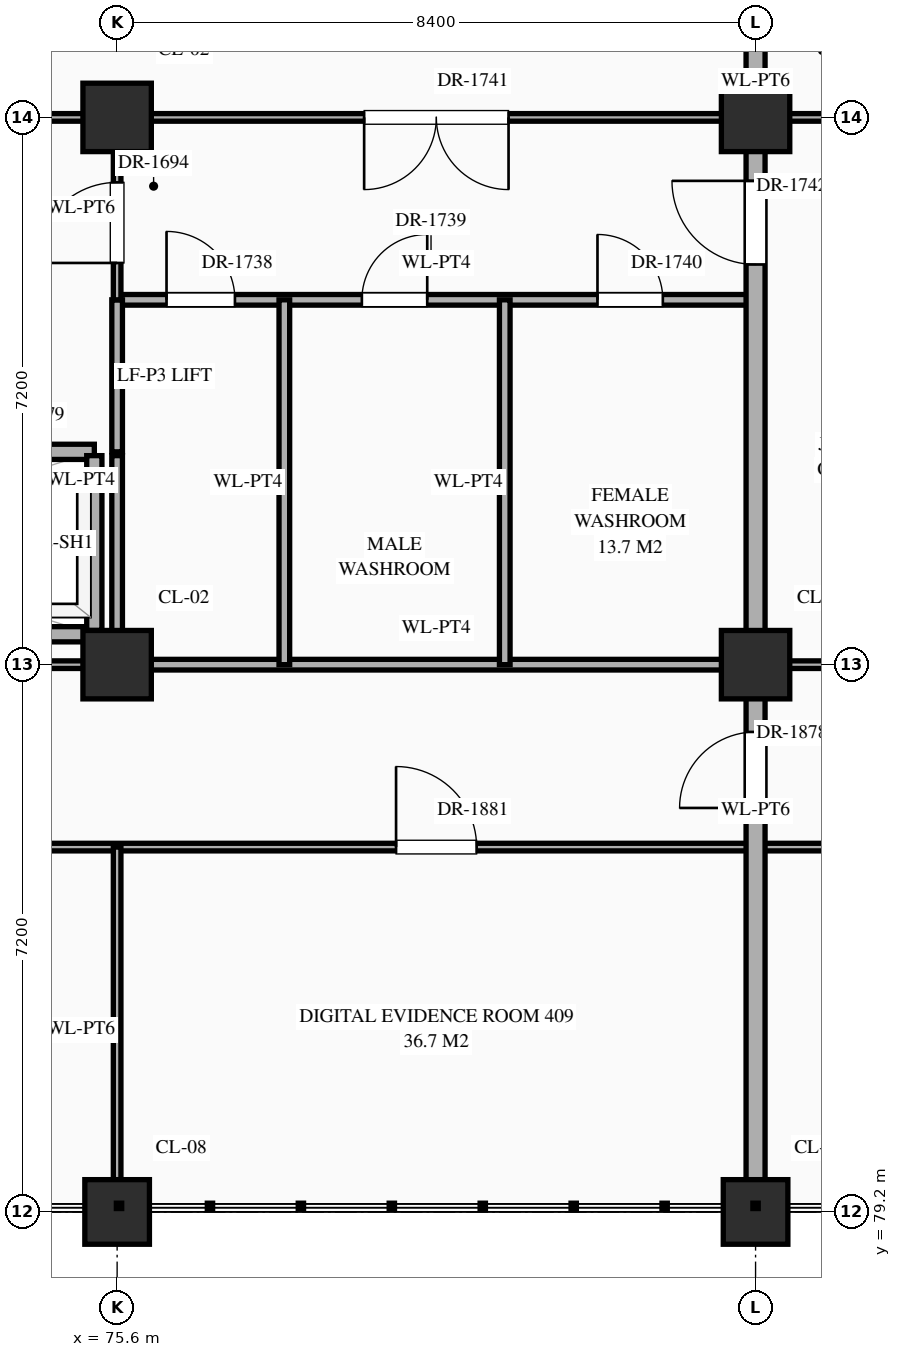
"""IFC4 building model, lengths in metres.
Left out: names, types, materials, properties, quantities, classifications, styles, units other than length and angle.
Written with IfcOpenShell. Run it as: python <this file> out.ifc"""

import sys

from ifc_helpers import new_model, si_unit, direction, frame, frame_2d, origin, origin_2d, place, context, subcontext, project, spatial, rectangle, circle, extrude, element, fill, save


model = new_model("IFC4")
c1 = context("Model", 3, precision=1e-05, world=origin(), true_north=direction((0.0, 1.0)))
c2 = subcontext(c1, "Body", "Model", "MODEL_VIEW")
j1 = project(units=[si_unit("LENGTHUNIT", "METRE"), si_unit("PLANEANGLEUNIT", "RADIAN")], contexts=[c1])
p1 = place(None, origin())
s1 = spatial("IfcSite", under=j1, at=p1, CompositionType="ELEMENT")
p2 = place(p1, origin())
s2 = spatial("IfcBuilding", under=s1, at=p2, CompositionType="ELEMENT")
p3 = place(p2, frame((0.0, 0.0, 16.2)))
s3 = spatial("IfcBuildingStorey", under=s2, at=p3, CompositionType="ELEMENT", Elevation=16.2)
p4 = place(p3, frame((75.6, 79.2, 0.0), z_axis=(0.0, 0.0, 1.0), x_axis=(1.0, 0.0, 0.0)))
e1 = element("IfcColumn", 1, at=p4, inside=s3, PredefinedType="COLUMN", context=c2, shape_type="SweptSolid", body=[
    extrude(circle(Radius=0.425, at=origin_2d()), origin(), (0.0, 0.0, 1.0), 5.4),
])
for number, where, z_axis, x_axis in (
    (2, (75.6, 86.4, 0.0), (0.0, 0.0, 1.0), (1.0, 0.0, 0.0)),
    (3, (75.6, 93.6, 0.0), (0.0, 0.0, 1.0), (1.0, 0.0, 0.0)),
):
    element("IfcColumn", number, at=place(p3, frame(where, z_axis=z_axis, x_axis=x_axis)), inside=s3, PredefinedType="COLUMN", context=c2, shape_type="SweptSolid", body=[
        extrude(rectangle(XDim=0.9, YDim=0.9, at=origin_2d()), origin(), (0.0, 0.0, 1.0), 5.4),
    ])
p5 = place(p3, frame((84.0, 79.2, 0.0), z_axis=(0.0, 0.0, 1.0), x_axis=(1.0, 0.0, 0.0)))
e4 = element("IfcColumn", 4, at=p5, inside=s3, PredefinedType="COLUMN", context=c2, shape_type="SweptSolid", body=[
    extrude(circle(Radius=0.425, at=origin_2d()), origin(), (0.0, 0.0, 1.0), 5.4),
])
for number, where, z_axis, x_axis in (
    (5, (84.0, 86.4, 0.0), (0.0, 0.0, 1.0), (1.0, 0.0, 0.0)),
    (6, (84.0, 93.6, 0.0), (0.0, 0.0, 1.0), (1.0, 0.0, 0.0)),
):
    element("IfcColumn", number, at=place(p3, frame(where, z_axis=z_axis, x_axis=x_axis)), inside=s3, PredefinedType="COLUMN", context=c2, shape_type="SweptSolid", body=[
        extrude(rectangle(XDim=0.9, YDim=0.9, at=origin_2d()), origin(), (0.0, 0.0, 1.0), 5.4),
    ])
p6 = place(p3, frame((67.2, 84.0, 0.0), z_axis=(0.0, 0.0, 1.0), x_axis=(1.0, 0.0, 0.0)))
e7 = element("IfcWall", 7, at=p6, inside=s3, PredefinedType="STANDARD", context=c2, shape_type="SweptSolid", body=[
    extrude(rectangle(XDim=33.6, YDim=0.1, at=frame_2d((16.8, 0.0))), origin(), (0.0, 0.0, 1.0), 5.12),
])
p7 = place(p6, frame((3.69, 0.0, 0.0)))
e8 = element("IfcOpeningElement", 8, at=p7, cuts=e7, PredefinedType="OPENING", context=c2, shape_type="SweptSolid", body=[
    extrude(rectangle(XDim=1.02, YDim=2.4, at=frame_2d((0.51, 1.2))), frame((0.0, 0.062, 0.0), z_axis=(0.0, -1.0, 0.0), x_axis=(1.0, 0.0, 0.0)), (0.0, 0.0, 1.0), 0.124),
])
p8 = place(p6, frame((12.07, 0.0, 0.0)))
e9 = element("IfcOpeningElement", 9, at=p8, cuts=e7, PredefinedType="OPENING", context=c2, shape_type="SweptSolid", body=[
    extrude(rectangle(XDim=1.06, YDim=2.4, at=frame_2d((0.53, 1.2))), frame((0.0, 0.062, 0.0), z_axis=(0.0, -1.0, 0.0), x_axis=(1.0, 0.0, 0.0)), (0.0, 0.0, 1.0), 0.124),
])
p9 = place(p6, frame((20.55, 0.0, 0.0)))
e10 = element("IfcOpeningElement", 10, at=p9, cuts=e7, PredefinedType="OPENING", context=c2, shape_type="SweptSolid", body=[
    extrude(rectangle(XDim=0.9, YDim=2.15, at=frame_2d((0.45, 1.075))), frame((0.0, 0.062, 0.0), z_axis=(0.0, -1.0, 0.0), x_axis=(1.0, 0.0, 0.0)), (0.0, 0.0, 1.0), 0.124),
])
p10 = place(p6, frame((28.97, 0.0, 0.0)))
e11 = element("IfcOpeningElement", 11, at=p10, cuts=e7, PredefinedType="OPENING", context=c2, shape_type="SweptSolid", body=[
    extrude(rectangle(XDim=0.86, YDim=2.1, at=frame_2d((0.43, 1.05))), frame((0.0, 0.062, 0.0), z_axis=(0.0, -1.0, 0.0), x_axis=(1.0, 0.0, 0.0)), (0.0, 0.0, 1.0), 0.124),
])
p11 = place(p3, frame((67.25, 86.4, 0.0), z_axis=(0.0, 0.0, 1.0), x_axis=(1.0, 0.0, 0.0)))
e12 = element("IfcWall", 12, at=p11, inside=s3, PredefinedType="STANDARD", context=c2, shape_type="SweptSolid", body=[
    extrude(rectangle(XDim=8.3, YDim=0.1, at=frame_2d((4.15, 0.0))), origin(), (0.0, 0.0, 1.0), 4.27),
])
p12 = place(p3, frame((75.6, 86.4, 0.0), z_axis=(0.0, 0.0, 1.0), x_axis=(1.0, 0.0, 0.0)))
e13 = element("IfcWall", 13, at=p12, inside=s3, PredefinedType="STANDARD", context=c2, shape_type="SweptSolid", body=[
    extrude(rectangle(XDim=8.4, YDim=0.14, at=frame_2d((4.2, 0.0))), origin(), (0.0, 0.0, 1.0), 4.27),
])
p13 = place(p3, frame((84.0, 86.4, 0.0), z_axis=(0.0, 0.0, 1.0), x_axis=(1.0, 0.0, 0.0)))
e14 = element("IfcWall", 14, at=p13, inside=s3, PredefinedType="STANDARD", context=c2, shape_type="SweptSolid", body=[
    extrude(rectangle(XDim=8.4, YDim=0.1, at=frame_2d((4.2, 0.0))), origin(), (0.0, 0.0, 1.0), 4.27),
])
p14 = place(p13, frame((1.065, 0.0, 0.0)))
e15 = element("IfcOpeningElement", 15, at=p14, cuts=e14, PredefinedType="OPENING", context=c2, shape_type="SweptSolid", body=[
    extrude(rectangle(XDim=1.04, YDim=2.2, at=frame_2d((0.52, 1.1))), frame((0.0, 0.062, 0.0), z_axis=(0.0, -1.0, 0.0), x_axis=(1.0, 0.0, 0.0)), (0.0, 0.0, 1.0), 0.124),
])
p15 = place(p13, frame((3.64, 0.0, 0.0)))
e16 = element("IfcOpeningElement", 16, at=p15, cuts=e14, PredefinedType="OPENING", context=c2, shape_type="SweptSolid", body=[
    extrude(rectangle(XDim=1.12, YDim=2.25, at=frame_2d((0.56, 1.125))), frame((0.0, 0.062, 0.0), z_axis=(0.0, -1.0, 0.0), x_axis=(1.0, 0.0, 0.0)), (0.0, 0.0, 1.0), 0.124),
])
p16 = place(p13, frame((6.235, 0.0, 0.0)))
e17 = element("IfcOpeningElement", 17, at=p16, cuts=e14, PredefinedType="OPENING", context=c2, shape_type="SweptSolid", body=[
    extrude(rectangle(XDim=1.16, YDim=2.3, at=frame_2d((0.58, 1.15))), frame((0.0, 0.062, 0.0), z_axis=(0.0, -1.0, 0.0), x_axis=(1.0, 0.0, 0.0)), (0.0, 0.0, 1.0), 0.124),
])
p17 = place(p3, frame((72.8, 86.8, 0.0), z_axis=(0.0, 0.0, 1.0), x_axis=(1.0, 0.0, 0.0)))
e18 = element("IfcWall", 18, at=p17, inside=s3, PredefinedType="STANDARD", context=c2, shape_type="SweptSolid", body=[
    extrude(rectangle(XDim=2.5, YDim=0.2, at=frame_2d((1.25, 0.0))), origin(), (0.0, 0.0, 1.0), 5.12),
])
p18 = place(p3, frame((67.6, 89.2, 0.0), z_axis=(0.0, 0.0, 1.0), x_axis=(1.0, 0.0, 0.0)))
e19 = element("IfcWall", 19, at=p18, inside=s3, PredefinedType="STANDARD", context=c2, shape_type="SweptSolid", body=[
    extrude(rectangle(XDim=7.7, YDim=0.2, at=frame_2d((3.85, 0.0))), origin(), (0.0, 0.0, 1.0), 5.12),
])
p19 = place(p18, frame((0.725, 0.0, 0.0)))
e20 = element("IfcOpeningElement", 20, at=p19, cuts=e19, PredefinedType="OPENING", context=c2, shape_type="SweptSolid", body=[
    extrude(rectangle(XDim=1.1, YDim=2.15, at=frame_2d((0.55, 1.075))), frame((0.0, 0.112, 0.0), z_axis=(0.0, -1.0, 0.0), x_axis=(1.0, 0.0, 0.0)), (0.0, 0.0, 1.0), 0.224),
])
p20 = place(p18, frame((3.3, 0.0, 0.0)))
e21 = element("IfcOpeningElement", 21, at=p20, cuts=e19, PredefinedType="OPENING", context=c2, shape_type="SweptSolid", body=[
    extrude(rectangle(XDim=1.1, YDim=2.15, at=frame_2d((0.55, 1.075))), frame((0.0, 0.112, 0.0), z_axis=(0.0, -1.0, 0.0), x_axis=(1.0, 0.0, 0.0)), (0.0, 0.0, 1.0), 0.224),
])
p21 = place(p18, frame((5.875, 0.0, 0.0)))
e22 = element("IfcOpeningElement", 22, at=p21, cuts=e19, PredefinedType="OPENING", context=c2, shape_type="SweptSolid", body=[
    extrude(rectangle(XDim=1.1, YDim=2.15, at=frame_2d((0.55, 1.075))), frame((0.0, 0.112, 0.0), z_axis=(0.0, -1.0, 0.0), x_axis=(1.0, 0.0, 0.0)), (0.0, 0.0, 1.0), 0.224),
])
p22 = place(p3, frame((75.6, 91.2, 0.0), z_axis=(0.0, 0.0, 1.0), x_axis=(1.0, 0.0, 0.0)))
e23 = element("IfcWall", 23, at=p22, inside=s3, PredefinedType="STANDARD", context=c2, shape_type="SweptSolid", body=[
    extrude(rectangle(XDim=8.4, YDim=0.14, at=frame_2d((4.2, 0.0))), origin(), (0.0, 0.0, 1.0), 5.12),
])
p23 = place(p22, frame((0.65, 0.0, 0.0)))
e24 = element("IfcOpeningElement", 24, at=p23, cuts=e23, PredefinedType="OPENING", context=c2, shape_type="SweptSolid", body=[
    extrude(rectangle(XDim=0.9, YDim=2.15, at=frame_2d((0.45, 1.075))), frame((0.0, 0.082, 0.0), z_axis=(0.0, -1.0, 0.0), x_axis=(1.0, 0.0, 0.0)), (0.0, 0.0, 1.0), 0.164),
])
p24 = place(p22, frame((3.22, 0.0, 0.0)))
e25 = element("IfcOpeningElement", 25, at=p24, cuts=e23, PredefinedType="OPENING", context=c2, shape_type="SweptSolid", body=[
    extrude(rectangle(XDim=0.86, YDim=2.1, at=frame_2d((0.43, 1.05))), frame((0.0, 0.082, 0.0), z_axis=(0.0, -1.0, 0.0), x_axis=(1.0, 0.0, 0.0)), (0.0, 0.0, 1.0), 0.164),
])
p25 = place(p22, frame((6.32, 0.0, 0.0)))
e26 = element("IfcOpeningElement", 26, at=p25, cuts=e23, PredefinedType="OPENING", context=c2, shape_type="SweptSolid", body=[
    extrude(rectangle(XDim=0.86, YDim=2.1, at=frame_2d((0.43, 1.05))), frame((0.0, 0.082, 0.0), z_axis=(0.0, -1.0, 0.0), x_axis=(1.0, 0.0, 0.0)), (0.0, 0.0, 1.0), 0.164),
])
p26 = place(p3, frame((67.2, 93.6, 0.0), z_axis=(0.0, 0.0, 1.0), x_axis=(1.0, 0.0, 0.0)))
e27 = element("IfcWall", 27, at=p26, inside=s3, PredefinedType="STANDARD", context=c2, shape_type="SweptSolid", body=[
    extrude(rectangle(XDim=33.6, YDim=0.1, at=frame_2d((16.8, 0.0))), origin(), (0.0, 0.0, 1.0), 4.27),
])
p27 = place(p26, frame((3.375, 0.0, 0.0)))
e28 = element("IfcOpeningElement", 28, at=p27, cuts=e27, PredefinedType="OPENING", context=c2, shape_type="SweptSolid", body=[
    extrude(rectangle(XDim=1.65, YDim=2.4, at=frame_2d((0.825, 1.2))), frame((0.0, 0.062, 0.0), z_axis=(0.0, -1.0, 0.0), x_axis=(1.0, 0.0, 0.0)), (0.0, 0.0, 1.0), 0.124),
])
p28 = place(p26, frame((28.625, 0.0, 0.0)))
e29 = element("IfcOpeningElement", 29, at=p28, cuts=e27, PredefinedType="OPENING", context=c2, shape_type="SweptSolid", body=[
    extrude(rectangle(XDim=1.55, YDim=2.35, at=frame_2d((0.775, 1.175))), frame((0.0, 0.062, 0.0), z_axis=(0.0, -1.0, 0.0), x_axis=(1.0, 0.0, 0.0)), (0.0, 0.0, 1.0), 0.124),
])
p29 = place(p26, frame((11.65, 0.0, 0.0)))
e30 = element("IfcOpeningElement", 30, at=p29, cuts=e27, PredefinedType="OPENING", context=c2, shape_type="SweptSolid", body=[
    extrude(rectangle(XDim=1.9, YDim=2.5, at=frame_2d((0.95, 1.25))), frame((0.0, 0.062, 0.0), z_axis=(0.0, -1.0, 0.0), x_axis=(1.0, 0.0, 0.0)), (0.0, 0.0, 1.0), 0.124),
])
p30 = place(p26, frame((17.935, 0.0, 0.0)))
e31 = element("IfcOpeningElement", 31, at=p30, cuts=e27, PredefinedType="OPENING", context=c2, shape_type="SweptSolid", body=[
    extrude(rectangle(XDim=0.9, YDim=2.15, at=frame_2d((0.45, 1.075))), frame((0.0, 0.062, 0.0), z_axis=(0.0, -1.0, 0.0), x_axis=(1.0, 0.0, 0.0)), (0.0, 0.0, 1.0), 0.124),
])
p31 = place(p26, frame((20.57, 0.0, 0.0)))
e32 = element("IfcOpeningElement", 32, at=p31, cuts=e27, PredefinedType="OPENING", context=c2, shape_type="SweptSolid", body=[
    extrude(rectangle(XDim=0.86, YDim=2.1, at=frame_2d((0.43, 1.05))), frame((0.0, 0.062, 0.0), z_axis=(0.0, -1.0, 0.0), x_axis=(1.0, 0.0, 0.0)), (0.0, 0.0, 1.0), 0.124),
])
p32 = place(p26, frame((23.155, 0.0, 0.0)))
e33 = element("IfcOpeningElement", 33, at=p32, cuts=e27, PredefinedType="OPENING", context=c2, shape_type="SweptSolid", body=[
    extrude(rectangle(XDim=0.92, YDim=2.15, at=frame_2d((0.46, 1.075))), frame((0.0, 0.062, 0.0), z_axis=(0.0, -1.0, 0.0), x_axis=(1.0, 0.0, 0.0)), (0.0, 0.0, 1.0), 0.124),
])
p33 = place(p3, frame((75.3, 86.85, 0.0), z_axis=(0.0, 0.0, 1.0), x_axis=(0.0, 1.0, 0.0)))
e34 = element("IfcWall", 34, at=p33, inside=s3, PredefinedType="STANDARD", context=c2, shape_type="SweptSolid", body=[
    extrude(rectangle(XDim=2.3, YDim=0.2, at=frame_2d((1.15, 0.0))), origin(), (0.0, 0.0, 1.0), 5.12),
])
p34 = place(p3, frame((75.6, 79.2, 0.0), z_axis=(0.0, 0.0, 1.0), x_axis=(0.0, 1.0, 0.0)))
e35 = element("IfcWall", 35, at=p34, inside=s3, PredefinedType="STANDARD", context=c2, shape_type="SweptSolid", body=[
    extrude(rectangle(XDim=4.8, YDim=0.1, at=frame_2d((2.4, 0.0))), origin(), (0.0, 0.0, 1.0), 4.37),
])
p35 = place(p3, frame((75.6, 86.45, 0.0), z_axis=(0.0, 0.0, 1.0), x_axis=(0.0, 1.0, 0.0)))
e36 = element("IfcWall", 36, at=p35, inside=s3, PredefinedType="STANDARD", context=c2, shape_type="SweptSolid", body=[
    extrude(rectangle(XDim=2.7, YDim=0.14, at=frame_2d((1.35, 0.0))), origin(), (0.0, 0.0, 1.0), 4.37),
])
p36 = place(p3, frame((75.6, 89.2, 0.0), z_axis=(0.0, 0.0, 1.0), x_axis=(0.0, 1.0, 0.0)))
e37 = element("IfcWall", 37, at=p36, inside=s3, PredefinedType="STANDARD", context=c2, shape_type="SweptSolid", body=[
    extrude(rectangle(XDim=2.0, YDim=0.14, at=frame_2d((1.0, 0.0))), origin(), (0.0, 0.0, 1.0), 4.37),
])
p37 = place(p3, frame((75.6, 91.2, 0.0), z_axis=(0.0, 0.0, 1.0), x_axis=(0.0, 1.0, 0.0)))
e38 = element("IfcWall", 38, at=p37, inside=s3, PredefinedType="STANDARD", context=c2, shape_type="SweptSolid", body=[
    extrude(rectangle(XDim=2.4, YDim=0.1, at=frame_2d((1.2, 0.0))), origin(), (0.0, 0.0, 1.0), 4.37),
])
p38 = place(p37, frame((0.485, 0.0, 0.0)))
e39 = element("IfcOpeningElement", 39, at=p38, cuts=e38, PredefinedType="OPENING", context=c2, shape_type="SweptSolid", body=[
    extrude(rectangle(XDim=1.06, YDim=2.4, at=frame_2d((0.53, 1.2))), frame((0.0, 0.062, 0.0), z_axis=(0.0, -1.0, 0.0), x_axis=(1.0, 0.0, 0.0)), (0.0, 0.0, 1.0), 0.124),
])
for number, where, z_axis, x_axis in (
    (40, (77.8, 86.4, 0.0), (0.0, 0.0, 1.0), (0.0, 1.0, 0.0)),
    (41, (80.7, 86.4, 0.0), (0.0, 0.0, 1.0), (0.0, 1.0, 0.0)),
):
    element("IfcWall", number, at=place(p3, frame(where, z_axis=z_axis, x_axis=x_axis)), inside=s3, PredefinedType="STANDARD", context=c2, shape_type="SweptSolid", body=[
        extrude(rectangle(XDim=4.8, YDim=0.14, at=frame_2d((2.4, 0.0))), origin(), (0.0, 0.0, 1.0), 5.12),
    ])
p39 = place(p3, frame((84.0, 79.2, 0.0), z_axis=(0.0, 0.0, 1.0), x_axis=(0.0, 1.0, 0.0)))
e42 = element("IfcWall", 42, at=p39, inside=s3, PredefinedType="STANDARD", context=c2, shape_type="SweptSolid", body=[
    extrude(rectangle(XDim=35.96, YDim=0.25, at=frame_2d((17.98, 0.0))), origin(), (0.0, 0.0, 1.0), 4.37),
])
p40 = place(p39, frame((22.585, 0.0, 0.0)))
e43 = element("IfcOpeningElement", 43, at=p40, cuts=e42, PredefinedType="OPENING", context=c2, shape_type="SweptSolid", body=[
    extrude(rectangle(XDim=2.0, YDim=2.4, at=frame_2d((1.0, 1.2))), frame((0.0, 0.137, 0.0), z_axis=(0.0, -1.0, 0.0), x_axis=(1.0, 0.0, 0.0)), (0.0, 0.0, 1.0), 0.274),
])
p41 = place(p39, frame((12.465, 0.0, 0.0)))
e44 = element("IfcOpeningElement", 44, at=p41, cuts=e42, PredefinedType="OPENING", context=c2, shape_type="SweptSolid", body=[
    extrude(rectangle(XDim=1.1, YDim=2.2, at=frame_2d((0.55, 1.1))), frame((0.0, 0.137, 0.0), z_axis=(0.0, -1.0, 0.0), x_axis=(1.0, 0.0, 0.0)), (0.0, 0.0, 1.0), 0.274),
])
p42 = place(p39, frame((15.31, 0.0, 0.0)))
e45 = element("IfcOpeningElement", 45, at=p42, cuts=e42, PredefinedType="OPENING", context=c2, shape_type="SweptSolid", body=[
    extrude(rectangle(XDim=0.95, YDim=2.15, at=frame_2d((0.475, 1.075))), frame((0.0, 0.137, 0.0), z_axis=(0.0, -1.0, 0.0), x_axis=(1.0, 0.0, 0.0)), (0.0, 0.0, 1.0), 0.274),
])
p43 = place(p39, frame((26.065, 0.0, 0.0)))
e46 = element("IfcOpeningElement", 46, at=p43, cuts=e42, PredefinedType="OPENING", context=c2, shape_type="SweptSolid", body=[
    extrude(rectangle(XDim=1.5, YDim=2.25, at=frame_2d((0.75, 1.125))), frame((0.0, 0.137, 0.0), z_axis=(0.0, -1.0, 0.0), x_axis=(1.0, 0.0, 0.0)), (0.0, 0.0, 1.0), 0.274),
])
p44 = place(p39, frame((29.71, 0.0, 0.0)))
e47 = element("IfcOpeningElement", 47, at=p44, cuts=e42, PredefinedType="OPENING", context=c2, shape_type="SweptSolid", body=[
    extrude(rectangle(XDim=0.95, YDim=2.15, at=frame_2d((0.475, 1.075))), frame((0.0, 0.137, 0.0), z_axis=(0.0, -1.0, 0.0), x_axis=(1.0, 0.0, 0.0)), (0.0, 0.0, 1.0), 0.274),
])
p45 = place(p39, frame((5.315, 0.0, 0.0)))
e48 = element("IfcOpeningElement", 48, at=p45, cuts=e42, PredefinedType="OPENING", context=c2, shape_type="SweptSolid", body=[
    extrude(rectangle(XDim=1.0, YDim=2.2, at=frame_2d((0.5, 1.1))), frame((0.0, 0.137, 0.0), z_axis=(0.0, -1.0, 0.0), x_axis=(1.0, 0.0, 0.0)), (0.0, 0.0, 1.0), 0.274),
])
p46 = place(p38, origin())
e49 = element("IfcDoor", 49, at=p46, inside=s3, OperationType="SINGLE_SWING_LEFT", PredefinedType="DOOR", context=c2, shape_type="SweptSolid", body=[
    extrude(rectangle(XDim=1.06, YDim=2.4, at=frame_2d((0.53, 1.2))), frame((0.0, 0.025, 0.0), z_axis=(0.0, -1.0, 0.0), x_axis=(1.0, 0.0, 0.0)), (0.0, 0.0, 1.0), 0.05),
])
fill(e39, e49)
p47 = place(p23, origin())
e50 = element("IfcDoor", 50, at=p47, inside=s3, OperationType="SINGLE_SWING_LEFT", PredefinedType="DOOR", context=c2, shape_type="SweptSolid", body=[
    extrude(rectangle(XDim=0.9, YDim=2.15, at=frame_2d((0.45, 1.075))), frame((0.0, 0.025, 0.0), z_axis=(0.0, -1.0, 0.0), x_axis=(1.0, 0.0, 0.0)), (0.0, 0.0, 1.0), 0.05),
])
fill(e24, e50)
p48 = place(p24, origin())
e51 = element("IfcDoor", 51, at=p48, inside=s3, OperationType="SINGLE_SWING_RIGHT", PredefinedType="DOOR", context=c2, shape_type="SweptSolid", body=[
    extrude(rectangle(XDim=0.86, YDim=2.1, at=frame_2d((0.43, 1.05))), frame((0.0, 0.025, 0.0), z_axis=(0.0, -1.0, 0.0), x_axis=(1.0, 0.0, 0.0)), (0.0, 0.0, 1.0), 0.05),
])
fill(e25, e51)
p49 = place(p25, origin())
e52 = element("IfcDoor", 52, at=p49, inside=s3, OperationType="SINGLE_SWING_LEFT", PredefinedType="DOOR", context=c2, shape_type="SweptSolid", body=[
    extrude(rectangle(XDim=0.86, YDim=2.1, at=frame_2d((0.43, 1.05))), frame((0.0, 0.025, 0.0), z_axis=(0.0, -1.0, 0.0), x_axis=(1.0, 0.0, 0.0)), (0.0, 0.0, 1.0), 0.05),
])
fill(e26, e52)
p50 = place(p29, frame((1.9, 0.0, 0.0), z_axis=(0.0, 0.0, 1.0), x_axis=(-1.0, 0.0, 0.0)))
e53 = element("IfcDoor", 53, at=p50, inside=s3, OperationType="DOUBLE_DOOR_SINGLE_SWING", PredefinedType="DOOR", context=c2, shape_type="SweptSolid", body=[
    extrude(rectangle(XDim=1.9, YDim=2.5, at=frame_2d((0.95, 1.25))), frame((0.0, 0.025, 0.0), z_axis=(0.0, -1.0, 0.0), x_axis=(1.0, 0.0, 0.0)), (0.0, 0.0, 1.0), 0.05),
])
fill(e30, e53)
p51 = place(p41, origin())
e54 = element("IfcDoor", 54, at=p51, inside=s3, OperationType="SINGLE_SWING_RIGHT", PredefinedType="DOOR", context=c2, shape_type="SweptSolid", body=[
    extrude(rectangle(XDim=1.1, YDim=2.2, at=frame_2d((0.55, 1.1))), frame((0.0, 0.025, 0.0), z_axis=(0.0, -1.0, 0.0), x_axis=(1.0, 0.0, 0.0)), (0.0, 0.0, 1.0), 0.05),
])
fill(e44, e54)
p52 = place(p45, origin())
e55 = element("IfcDoor", 55, at=p52, inside=s3, OperationType="SINGLE_SWING_LEFT", PredefinedType="DOOR", context=c2, shape_type="SweptSolid", body=[
    extrude(rectangle(XDim=1.0, YDim=2.2, at=frame_2d((0.5, 1.1))), frame((0.0, 0.025, 0.0), z_axis=(0.0, -1.0, 0.0), x_axis=(1.0, 0.0, 0.0)), (0.0, 0.0, 1.0), 0.05),
])
fill(e48, e55)
p53 = place(p8, origin())
e56 = element("IfcDoor", 56, at=p53, inside=s3, OperationType="SINGLE_SWING_LEFT", PredefinedType="DOOR", context=c2, shape_type="SweptSolid", body=[
    extrude(rectangle(XDim=1.06, YDim=2.4, at=frame_2d((0.53, 1.2))), frame((0.0, 0.025, 0.0), z_axis=(0.0, -1.0, 0.0), x_axis=(1.0, 0.0, 0.0)), (0.0, 0.0, 1.0), 0.05),
])
fill(e9, e56)
save(model, sys.argv[1])
